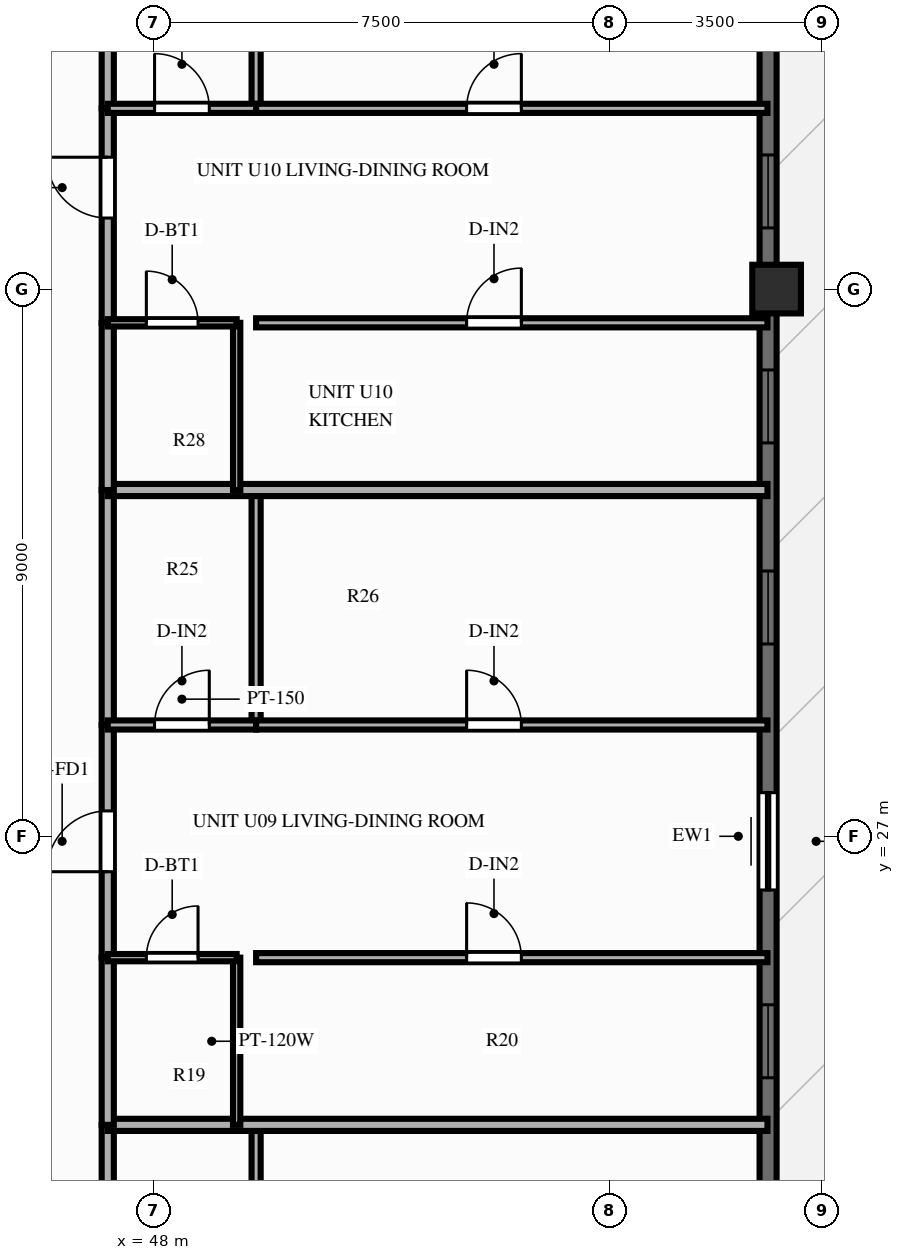
"""IFC4 building model, lengths in metres.
Left out: names, types, materials, properties, quantities, classifications, styles, units other than length and angle.
Written with IfcOpenShell. Run it as: python <this file> out.ifc"""

import sys

from ifc_helpers import new_model, si_unit, direction, frame, frame_2d, origin, origin_2d, place, context, subcontext, project, spatial, rectangle, extrude, source, transform, mapped, element, fill, save


model = new_model("IFC4")
c1 = context("Model", 3, precision=1e-05, world=origin(), true_north=direction((0.0, 1.0)))
c2 = subcontext(c1, "Body", "Model", "MODEL_VIEW")
j1 = project(units=[si_unit("LENGTHUNIT", "METRE"), si_unit("PLANEANGLEUNIT", "RADIAN")], contexts=[c1])
p1 = place(None, origin())
s1 = spatial("IfcSite", under=j1, at=p1, CompositionType="ELEMENT")
p2 = place(p1, origin())
s2 = spatial("IfcBuilding", under=s1, at=p2, CompositionType="ELEMENT")
p3 = place(p2, frame((0.0, 0.0, 179.8)))
s3 = spatial("IfcBuildingStorey", under=s2, at=p3, CompositionType="ELEMENT", Elevation=179.8)
m1 = source(origin(), c2, "Body", "SweptSolid", [
    extrude(rectangle(XDim=0.8, YDim=0.8, at=origin_2d()), origin(), (0.0, 0.0, 1.0), 3.0),
])
p4 = place(p3, frame((58.25, 36.0, 0.0), z_axis=(0.0, 0.0, 1.0), x_axis=(1.0, 0.0, 0.0)))
e1 = element("IfcColumn", 1, at=p4, inside=s3, PredefinedType="COLUMN", context=c2, shape_type="MappedRepresentation", body=[
    mapped(m1, transform((0.0, 0.0, 0.0), scale=1.0)),
])
p5 = place(p3, frame((58.11, 11.0, 0.0), z_axis=(0.0, 0.0, 1.0), x_axis=(0.0, 1.0, 0.0)))
e2 = element("IfcWall", 2, at=p5, inside=s3, PredefinedType="SOLIDWALL", context=c2, shape_type="SweptSolid", body=[
    extrude(rectangle(XDim=32.0, YDim=0.28, at=frame_2d((16.0, 0.0))), origin(), (0.0, 0.0, 1.0), 2.28),
])
p6 = place(p5, frame((1.05, 0.0, 0.25)))
e3 = element("IfcOpeningElement", 3, at=p6, cuts=e2, PredefinedType="OPENING", context=c2, shape_type="SweptSolid", body=[
    extrude(rectangle(XDim=1.2, YDim=1.5, at=frame_2d((0.6, 0.75))), frame((0.0, 0.152, 0.0), z_axis=(0.0, -1.0, 0.0), x_axis=(1.0, 0.0, 0.0)), (0.0, 0.0, 1.0), 0.304),
])
p7 = place(p5, frame((4.31, 0.0, 0.25)))
e4 = element("IfcOpeningElement", 4, at=p7, cuts=e2, PredefinedType="OPENING", context=c2, shape_type="SweptSolid", body=[
    extrude(rectangle(XDim=1.2, YDim=1.5, at=frame_2d((0.6, 0.75))), frame((0.0, 0.152, 0.0), z_axis=(0.0, -1.0, 0.0), x_axis=(1.0, 0.0, 0.0)), (0.0, 0.0, 1.0), 0.304),
])
p8 = place(p5, frame((8.882, 0.0, 0.25)))
e5 = element("IfcOpeningElement", 5, at=p8, cuts=e2, PredefinedType="OPENING", context=c2, shape_type="SweptSolid", body=[
    extrude(rectangle(XDim=1.2, YDim=1.5, at=frame_2d((0.6, 0.75))), frame((0.0, 0.152, 0.0), z_axis=(0.0, -1.0, 0.0), x_axis=(1.0, 0.0, 0.0)), (0.0, 0.0, 1.0), 0.304),
])
p9 = place(p5, frame((12.029, 0.0, 0.25)))
e6 = element("IfcOpeningElement", 6, at=p9, cuts=e2, PredefinedType="OPENING", context=c2, shape_type="SweptSolid", body=[
    extrude(rectangle(XDim=1.2, YDim=1.5, at=frame_2d((0.6, 0.75))), frame((0.0, 0.152, 0.0), z_axis=(0.0, -1.0, 0.0), x_axis=(1.0, 0.0, 0.0)), (0.0, 0.0, 1.0), 0.304),
])
p10 = place(p5, frame((16.718, 0.0, 0.0), z_axis=(0.0, 0.0, 1.0), x_axis=(-1.0, 0.0, 0.0)))
e7 = element("IfcOpeningElement", 7, at=p10, cuts=e2, PredefinedType="OPENING", context=c2, shape_type="SweptSolid", body=[
    extrude(rectangle(XDim=1.6, YDim=2.15, at=frame_2d((0.8, 1.075))), frame((0.0, 0.152, 0.0), z_axis=(0.0, -1.0, 0.0), x_axis=(1.0, 0.0, 0.0)), (0.0, 0.0, 1.0), 0.304),
])
p11 = place(p5, frame((19.163, 0.0, 0.25)))
e8 = element("IfcOpeningElement", 8, at=p11, cuts=e2, PredefinedType="OPENING", context=c2, shape_type="SweptSolid", body=[
    extrude(rectangle(XDim=1.2, YDim=1.5, at=frame_2d((0.6, 0.75))), frame((0.0, 0.152, 0.0), z_axis=(0.0, -1.0, 0.0), x_axis=(1.0, 0.0, 0.0)), (0.0, 0.0, 1.0), 0.304),
])
p12 = place(p5, frame((22.47, 0.0, 0.25)))
e9 = element("IfcOpeningElement", 9, at=p12, cuts=e2, PredefinedType="OPENING", context=c2, shape_type="SweptSolid", body=[
    extrude(rectangle(XDim=1.2, YDim=1.5, at=frame_2d((0.6, 0.75))), frame((0.0, 0.152, 0.0), z_axis=(0.0, -1.0, 0.0), x_axis=(1.0, 0.0, 0.0)), (0.0, 0.0, 1.0), 0.304),
])
p13 = place(p5, frame((26.006, 0.0, 0.25)))
e10 = element("IfcOpeningElement", 10, at=p13, cuts=e2, PredefinedType="OPENING", context=c2, shape_type="SweptSolid", body=[
    extrude(rectangle(XDim=1.2, YDim=1.5, at=frame_2d((0.6, 0.75))), frame((0.0, 0.152, 0.0), z_axis=(0.0, -1.0, 0.0), x_axis=(1.0, 0.0, 0.0)), (0.0, 0.0, 1.0), 0.304),
])
p14 = place(p5, frame((29.266, 0.0, 0.25)))
e11 = element("IfcOpeningElement", 11, at=p14, cuts=e2, PredefinedType="OPENING", context=c2, shape_type="SweptSolid", body=[
    extrude(rectangle(XDim=1.2, YDim=1.5, at=frame_2d((0.6, 0.75))), frame((0.0, 0.152, 0.0), z_axis=(0.0, -1.0, 0.0), x_axis=(1.0, 0.0, 0.0)), (0.0, 0.0, 1.0), 0.304),
])
p15 = place(p3, frame((47.25, 18.71, 0.0), z_axis=(0.0, 0.0, 1.0), x_axis=(0.0, 1.0, 0.0)))
e12 = element("IfcWall", 12, at=p15, inside=s3, PredefinedType="PARTITIONING", context=c2, shape_type="SweptSolid", body=[
    extrude(rectangle(XDim=3.544, YDim=0.2, at=frame_2d((1.772, 0.0))), origin(), (0.0, 0.0, 1.0), 2.79),
])
p16 = place(p3, frame((49.69, 18.71, 0.0), z_axis=(0.0, 0.0, 1.0), x_axis=(0.0, 1.0, 0.0)))
e13 = element("IfcWall", 13, at=p16, inside=s3, PredefinedType="PARTITIONING", context=c2, shape_type="SweptSolid", body=[
    extrude(rectangle(XDim=3.544, YDim=0.15, at=frame_2d((1.772, 0.0))), origin(), (0.0, 0.0, 1.0), 2.79),
])
p17 = place(p3, frame((47.25, 22.254, 0.0), z_axis=(0.0, 0.0, 1.0), x_axis=(1.0, 0.0, 0.0)))
e14 = element("IfcWall", 14, at=p17, inside=s3, PredefinedType="PARTITIONING", context=c2, shape_type="SweptSolid", body=[
    extrude(rectangle(XDim=10.85, YDim=0.2, at=frame_2d((5.425, 0.0))), origin(), (0.0, 0.0, 1.0), 2.39),
])
p18 = place(p3, frame((47.25, 22.254, 0.0), z_axis=(0.0, 0.0, 1.0), x_axis=(0.0, 1.0, 0.0)))
e15 = element("IfcWall", 15, at=p18, inside=s3, PredefinedType="PARTITIONING", context=c2, shape_type="SweptSolid", body=[
    extrude(rectangle(XDim=2.75, YDim=0.2, at=frame_2d((1.375, 0.0))), origin(), (0.0, 0.0, 1.0), 2.79),
])
p19 = place(p3, frame((47.25, 25.004, 0.0), z_axis=(0.0, 0.0, 1.0), x_axis=(0.0, 1.0, 0.0)))
e16 = element("IfcWall", 16, at=p19, inside=s3, PredefinedType="PARTITIONING", context=c2, shape_type="SweptSolid", body=[
    extrude(rectangle(XDim=3.827, YDim=0.2, at=frame_2d((1.914, 0.0))), origin(), (0.0, 0.0, 1.0), 2.79),
])
p20 = place(p19, frame((1.413, 0.0, 0.0)))
e17 = element("IfcOpeningElement", 17, at=p20, cuts=e16, PredefinedType="OPENING", context=c2, shape_type="SweptSolid", body=[
    extrude(rectangle(XDim=1.0, YDim=2.15, at=frame_2d((0.5, 1.075))), frame((0.0, 0.112, 0.0), z_axis=(0.0, -1.0, 0.0), x_axis=(1.0, 0.0, 0.0)), (0.0, 0.0, 1.0), 0.224),
])
p21 = place(p3, frame((47.25, 28.831, 0.0), z_axis=(0.0, 0.0, 1.0), x_axis=(0.0, 1.0, 0.0)))
e18 = element("IfcWall", 18, at=p21, inside=s3, PredefinedType="PARTITIONING", context=c2, shape_type="SweptSolid", body=[
    extrude(rectangle(XDim=3.865, YDim=0.2, at=frame_2d((1.932, 0.0))), origin(), (0.0, 0.0, 1.0), 2.79),
])
p22 = place(p3, frame((49.37, 22.254, 0.0), z_axis=(0.0, 0.0, 1.0), x_axis=(0.0, 1.0, 0.0)))
e19 = element("IfcWall", 19, at=p22, inside=s3, PredefinedType="PARTITIONING", context=c2, shape_type="SweptSolid", body=[
    extrude(rectangle(XDim=2.75, YDim=0.12, at=frame_2d((1.375, 0.0))), origin(), (0.0, 0.0, 1.0), 2.79),
])
p23 = place(p3, frame((49.69, 28.831, 0.0), z_axis=(0.0, 0.0, 1.0), x_axis=(0.0, 1.0, 0.0)))
e20 = element("IfcWall", 20, at=p23, inside=s3, PredefinedType="PARTITIONING", context=c2, shape_type="SweptSolid", body=[
    extrude(rectangle(XDim=3.865, YDim=0.15, at=frame_2d((1.932, 0.0))), origin(), (0.0, 0.0, 1.0), 2.79),
])
p24 = place(p3, frame((47.25, 25.004, 0.0), z_axis=(0.0, 0.0, 1.0), x_axis=(1.0, 0.0, 0.0)))
e21 = element("IfcWall", 21, at=p24, inside=s3, PredefinedType="PARTITIONING", context=c2, shape_type="SweptSolid", body=[
    extrude(rectangle(XDim=2.12, YDim=0.12, at=frame_2d((1.06, 0.0))), origin(), (0.0, 0.0, 1.0), 2.79),
])
p25 = place(p24, frame((0.635, 0.0, 0.0)))
e22 = element("IfcOpeningElement", 22, at=p25, cuts=e21, PredefinedType="OPENING", context=c2, shape_type="SweptSolid", body=[
    extrude(rectangle(XDim=0.85, YDim=2.05, at=frame_2d((0.425, 1.025))), frame((0.0, 0.072, 0.0), z_axis=(0.0, -1.0, 0.0), x_axis=(1.0, 0.0, 0.0)), (0.0, 0.0, 1.0), 0.144),
])
p26 = place(p3, frame((49.69, 25.004, 0.0), z_axis=(0.0, 0.0, 1.0), x_axis=(1.0, 0.0, 0.0)))
e23 = element("IfcWall", 23, at=p26, inside=s3, PredefinedType="PARTITIONING", context=c2, shape_type="SweptSolid", body=[
    extrude(rectangle(XDim=8.41, YDim=0.15, at=frame_2d((4.205, 0.0))), origin(), (0.0, 0.0, 1.0), 2.79),
])
p27 = place(p26, frame((3.462, 0.0, 0.0)))
e24 = element("IfcOpeningElement", 24, at=p27, cuts=e23, PredefinedType="OPENING", context=c2, shape_type="SweptSolid", body=[
    extrude(rectangle(XDim=0.9, YDim=2.1, at=frame_2d((0.45, 1.05))), frame((0.0, 0.087, 0.0), z_axis=(0.0, -1.0, 0.0), x_axis=(1.0, 0.0, 0.0)), (0.0, 0.0, 1.0), 0.174),
])
p28 = place(p3, frame((47.25, 28.831, 0.0), z_axis=(0.0, 0.0, 1.0), x_axis=(1.0, 0.0, 0.0)))
e25 = element("IfcWall", 25, at=p28, inside=s3, PredefinedType="PARTITIONING", context=c2, shape_type="SweptSolid", body=[
    extrude(rectangle(XDim=2.44, YDim=0.15, at=frame_2d((1.22, 0.0))), origin(), (0.0, 0.0, 1.0), 2.79),
])
p29 = place(p28, frame((0.77, 0.0, 0.0)))
e26 = element("IfcOpeningElement", 26, at=p29, cuts=e25, PredefinedType="OPENING", context=c2, shape_type="SweptSolid", body=[
    extrude(rectangle(XDim=0.9, YDim=2.1, at=frame_2d((0.45, 1.05))), frame((0.0, 0.087, 0.0), z_axis=(0.0, -1.0, 0.0), x_axis=(1.0, 0.0, 0.0)), (0.0, 0.0, 1.0), 0.174),
])
p30 = place(p3, frame((49.69, 28.831, 0.0), z_axis=(0.0, 0.0, 1.0), x_axis=(1.0, 0.0, 0.0)))
e27 = element("IfcWall", 27, at=p30, inside=s3, PredefinedType="PARTITIONING", context=c2, shape_type="SweptSolid", body=[
    extrude(rectangle(XDim=8.41, YDim=0.15, at=frame_2d((4.205, 0.0))), origin(), (0.0, 0.0, 1.0), 2.79),
])
p31 = place(p30, frame((3.462, 0.0, 0.0)))
e28 = element("IfcOpeningElement", 28, at=p31, cuts=e27, PredefinedType="OPENING", context=c2, shape_type="SweptSolid", body=[
    extrude(rectangle(XDim=0.9, YDim=2.1, at=frame_2d((0.45, 1.05))), frame((0.0, 0.087, 0.0), z_axis=(0.0, -1.0, 0.0), x_axis=(1.0, 0.0, 0.0)), (0.0, 0.0, 1.0), 0.174),
])
p32 = place(p3, frame((47.25, 32.695, 0.0), z_axis=(0.0, 0.0, 1.0), x_axis=(1.0, 0.0, 0.0)))
e29 = element("IfcWall", 29, at=p32, inside=s3, PredefinedType="PARTITIONING", context=c2, shape_type="SweptSolid", body=[
    extrude(rectangle(XDim=10.85, YDim=0.2, at=frame_2d((5.425, 0.0))), origin(), (0.0, 0.0, 1.0), 2.79),
])
p33 = place(p3, frame((47.25, 32.695, 0.0), z_axis=(0.0, 0.0, 1.0), x_axis=(0.0, 1.0, 0.0)))
e30 = element("IfcWall", 30, at=p33, inside=s3, PredefinedType="PARTITIONING", context=c2, shape_type="SweptSolid", body=[
    extrude(rectangle(XDim=2.75, YDim=0.2, at=frame_2d((1.375, 0.0))), origin(), (0.0, 0.0, 1.0), 2.79),
])
p34 = place(p3, frame((47.25, 35.445, 0.0), z_axis=(0.0, 0.0, 1.0), x_axis=(0.0, 1.0, 0.0)))
e31 = element("IfcWall", 31, at=p34, inside=s3, PredefinedType="PARTITIONING", context=c2, shape_type="SweptSolid", body=[
    extrude(rectangle(XDim=3.527, YDim=0.2, at=frame_2d((1.764, 0.0))), origin(), (0.0, 0.0, 1.0), 2.79),
])
p35 = place(p34, frame((1.724, 0.0, 0.0)))
e32 = element("IfcOpeningElement", 32, at=p35, cuts=e31, PredefinedType="OPENING", context=c2, shape_type="SweptSolid", body=[
    extrude(rectangle(XDim=1.0, YDim=2.15, at=frame_2d((0.5, 1.075))), frame((0.0, 0.112, 0.0), z_axis=(0.0, -1.0, 0.0), x_axis=(1.0, 0.0, 0.0)), (0.0, 0.0, 1.0), 0.224),
])
p36 = place(p3, frame((47.25, 38.973, 0.0), z_axis=(0.0, 0.0, 1.0), x_axis=(0.0, 1.0, 0.0)))
e33 = element("IfcWall", 33, at=p36, inside=s3, PredefinedType="PARTITIONING", context=c2, shape_type="SweptSolid", body=[
    extrude(rectangle(XDim=3.847, YDim=0.2, at=frame_2d((1.924, 0.0))), origin(), (0.0, 0.0, 1.0), 2.79),
])
p37 = place(p3, frame((49.37, 32.695, 0.0), z_axis=(0.0, 0.0, 1.0), x_axis=(0.0, 1.0, 0.0)))
e34 = element("IfcWall", 34, at=p37, inside=s3, PredefinedType="PARTITIONING", context=c2, shape_type="SweptSolid", body=[
    extrude(rectangle(XDim=2.75, YDim=0.12, at=frame_2d((1.375, 0.0))), origin(), (0.0, 0.0, 1.0), 2.79),
])
p38 = place(p3, frame((49.69, 38.973, 0.0), z_axis=(0.0, 0.0, 1.0), x_axis=(0.0, 1.0, 0.0)))
e35 = element("IfcWall", 35, at=p38, inside=s3, PredefinedType="PARTITIONING", context=c2, shape_type="SweptSolid", body=[
    extrude(rectangle(XDim=3.847, YDim=0.15, at=frame_2d((1.924, 0.0))), origin(), (0.0, 0.0, 1.0), 2.79),
])
p39 = place(p3, frame((47.25, 35.445, 0.0), z_axis=(0.0, 0.0, 1.0), x_axis=(1.0, 0.0, 0.0)))
e36 = element("IfcWall", 36, at=p39, inside=s3, PredefinedType="PARTITIONING", context=c2, shape_type="SweptSolid", body=[
    extrude(rectangle(XDim=2.12, YDim=0.12, at=frame_2d((1.06, 0.0))), origin(), (0.0, 0.0, 1.0), 2.79),
])
p40 = place(p39, frame((0.635, 0.0, 0.0)))
e37 = element("IfcOpeningElement", 37, at=p40, cuts=e36, PredefinedType="OPENING", context=c2, shape_type="SweptSolid", body=[
    extrude(rectangle(XDim=0.85, YDim=2.05, at=frame_2d((0.425, 1.025))), frame((0.0, 0.072, 0.0), z_axis=(0.0, -1.0, 0.0), x_axis=(1.0, 0.0, 0.0)), (0.0, 0.0, 1.0), 0.144),
])
p41 = place(p3, frame((49.69, 35.445, 0.0), z_axis=(0.0, 0.0, 1.0), x_axis=(1.0, 0.0, 0.0)))
e38 = element("IfcWall", 38, at=p41, inside=s3, PredefinedType="PARTITIONING", context=c2, shape_type="SweptSolid", body=[
    extrude(rectangle(XDim=8.41, YDim=0.15, at=frame_2d((4.205, 0.0))), origin(), (0.0, 0.0, 1.0), 2.79),
])
p42 = place(p41, frame((3.462, 0.0, 0.0)))
e39 = element("IfcOpeningElement", 39, at=p42, cuts=e38, PredefinedType="OPENING", context=c2, shape_type="SweptSolid", body=[
    extrude(rectangle(XDim=0.9, YDim=2.1, at=frame_2d((0.45, 1.05))), frame((0.0, 0.087, 0.0), z_axis=(0.0, -1.0, 0.0), x_axis=(1.0, 0.0, 0.0)), (0.0, 0.0, 1.0), 0.174),
])
p43 = place(p3, frame((47.25, 38.973, 0.0), z_axis=(0.0, 0.0, 1.0), x_axis=(1.0, 0.0, 0.0)))
e40 = element("IfcWall", 40, at=p43, inside=s3, PredefinedType="PARTITIONING", context=c2, shape_type="SweptSolid", body=[
    extrude(rectangle(XDim=2.44, YDim=0.15, at=frame_2d((1.22, 0.0))), origin(), (0.0, 0.0, 1.0), 2.79),
])
p44 = place(p43, frame((0.77, 0.0, 0.0)))
e41 = element("IfcOpeningElement", 41, at=p44, cuts=e40, PredefinedType="OPENING", context=c2, shape_type="SweptSolid", body=[
    extrude(rectangle(XDim=0.9, YDim=2.1, at=frame_2d((0.45, 1.05))), frame((0.0, 0.087, 0.0), z_axis=(0.0, -1.0, 0.0), x_axis=(1.0, 0.0, 0.0)), (0.0, 0.0, 1.0), 0.174),
])
p45 = place(p3, frame((49.69, 38.973, 0.0), z_axis=(0.0, 0.0, 1.0), x_axis=(1.0, 0.0, 0.0)))
e42 = element("IfcWall", 42, at=p45, inside=s3, PredefinedType="PARTITIONING", context=c2, shape_type="SweptSolid", body=[
    extrude(rectangle(XDim=8.41, YDim=0.15, at=frame_2d((4.205, 0.0))), origin(), (0.0, 0.0, 1.0), 2.79),
])
p46 = place(p45, frame((3.462, 0.0, 0.0)))
e43 = element("IfcOpeningElement", 43, at=p46, cuts=e42, PredefinedType="OPENING", context=c2, shape_type="SweptSolid", body=[
    extrude(rectangle(XDim=0.9, YDim=2.1, at=frame_2d((0.45, 1.05))), frame((0.0, 0.087, 0.0), z_axis=(0.0, -1.0, 0.0), x_axis=(1.0, 0.0, 0.0)), (0.0, 0.0, 1.0), 0.174),
])
m2 = source(origin(), c2, "Body", "SweptSolid", [
    extrude(rectangle(XDim=1.2, YDim=1.5, at=frame_2d((0.6, 0.75))), frame((0.0, 0.03, 0.0), z_axis=(0.0, -1.0, 0.0), x_axis=(1.0, 0.0, 0.0)), (0.0, 0.0, 1.0), 0.06),
])
p47 = place(p9, origin())
e44 = element("IfcWindow", 44, at=p47, inside=s3, PartitioningType="SINGLE_PANEL", PredefinedType="WINDOW", context=c2, shape_type="MappedRepresentation", body=[
    mapped(m2, transform((0.0, 0.0, 0.0), scale=1.0)),
])
fill(e6, e44)
m3 = source(origin(), c2, "Body", "SweptSolid", [
    extrude(rectangle(XDim=1.6, YDim=2.15, at=frame_2d((0.8, 1.075))), frame((0.0, 0.025, 0.0), z_axis=(0.0, -1.0, 0.0), x_axis=(1.0, 0.0, 0.0)), (0.0, 0.0, 1.0), 0.05),
])
p48 = place(p10, origin())
e45 = element("IfcDoor", 45, at=p48, inside=s3, OperationType="SLIDING_TO_LEFT", PredefinedType="DOOR", context=c2, shape_type="MappedRepresentation", body=[
    mapped(m3, transform((0.0, 0.0, 0.0), scale=1.0)),
])
fill(e7, e45)
p49 = place(p11, origin())
e46 = element("IfcWindow", 46, at=p49, inside=s3, PartitioningType="SINGLE_PANEL", PredefinedType="WINDOW", context=c2, shape_type="MappedRepresentation", body=[
    mapped(m2, transform((0.0, 0.0, 0.0), scale=1.0)),
])
fill(e8, e46)
p50 = place(p12, origin())
e47 = element("IfcWindow", 47, at=p50, inside=s3, PartitioningType="SINGLE_PANEL", PredefinedType="WINDOW", context=c2, shape_type="MappedRepresentation", body=[
    mapped(m2, transform((0.0, 0.0, 0.0), scale=1.0)),
])
fill(e9, e47)
p51 = place(p13, origin())
e48 = element("IfcWindow", 48, at=p51, inside=s3, PartitioningType="SINGLE_PANEL", PredefinedType="WINDOW", context=c2, shape_type="MappedRepresentation", body=[
    mapped(m2, transform((0.0, 0.0, 0.0), scale=1.0)),
])
fill(e10, e48)
m4 = source(origin(), c2, "Body", "SweptSolid", [
    extrude(rectangle(XDim=1.0, YDim=2.15, at=frame_2d((0.5, 1.075))), frame((0.0, 0.025, 0.0), z_axis=(0.0, -1.0, 0.0), x_axis=(1.0, 0.0, 0.0)), (0.0, 0.0, 1.0), 0.05),
])
p52 = place(p20, origin())
e49 = element("IfcDoor", 49, at=p52, inside=s3, OperationType="SINGLE_SWING_LEFT", PredefinedType="DOOR", context=c2, shape_type="MappedRepresentation", body=[
    mapped(m4, transform((0.0, 0.0, 0.0), scale=1.0)),
])
fill(e17, e49)
m5 = source(origin(), c2, "Body", "SweptSolid", [
    extrude(rectangle(XDim=0.85, YDim=2.05, at=frame_2d((0.425, 1.025))), frame((0.0, 0.025, 0.0), z_axis=(0.0, -1.0, 0.0), x_axis=(1.0, 0.0, 0.0)), (0.0, 0.0, 1.0), 0.05),
])
p53 = place(p25, origin())
e50 = element("IfcDoor", 50, at=p53, inside=s3, OperationType="SINGLE_SWING_RIGHT", PredefinedType="DOOR", context=c2, shape_type="MappedRepresentation", body=[
    mapped(m5, transform((0.0, 0.0, 0.0), scale=1.0)),
])
fill(e22, e50)
m6 = source(origin(), c2, "Body", "SweptSolid", [
    extrude(rectangle(XDim=0.9, YDim=2.1, at=frame_2d((0.45, 1.05))), frame((0.0, 0.025, 0.0), z_axis=(0.0, -1.0, 0.0), x_axis=(1.0, 0.0, 0.0)), (0.0, 0.0, 1.0), 0.05),
])
p54 = place(p27, origin())
e51 = element("IfcDoor", 51, at=p54, inside=s3, OperationType="SINGLE_SWING_LEFT", PredefinedType="DOOR", context=c2, shape_type="MappedRepresentation", body=[
    mapped(m6, transform((0.0, 0.0, 0.0), scale=1.0)),
])
fill(e24, e51)
p55 = place(p29, origin())
e52 = element("IfcDoor", 52, at=p55, inside=s3, OperationType="SINGLE_SWING_RIGHT", PredefinedType="DOOR", context=c2, shape_type="MappedRepresentation", body=[
    mapped(m6, transform((0.0, 0.0, 0.0), scale=1.0)),
])
fill(e26, e52)
p56 = place(p31, origin())
e53 = element("IfcDoor", 53, at=p56, inside=s3, OperationType="SINGLE_SWING_LEFT", PredefinedType="DOOR", context=c2, shape_type="MappedRepresentation", body=[
    mapped(m6, transform((0.0, 0.0, 0.0), scale=1.0)),
])
fill(e28, e53)
p57 = place(p35, origin())
e54 = element("IfcDoor", 54, at=p57, inside=s3, OperationType="SINGLE_SWING_RIGHT", PredefinedType="DOOR", context=c2, shape_type="MappedRepresentation", body=[
    mapped(m4, transform((0.0, 0.0, 0.0), scale=1.0)),
])
fill(e32, e54)
p58 = place(p40, origin())
e55 = element("IfcDoor", 55, at=p58, inside=s3, OperationType="SINGLE_SWING_LEFT", PredefinedType="DOOR", context=c2, shape_type="MappedRepresentation", body=[
    mapped(m5, transform((0.0, 0.0, 0.0), scale=1.0)),
])
fill(e37, e55)
p59 = place(p42, origin())
e56 = element("IfcDoor", 56, at=p59, inside=s3, OperationType="SINGLE_SWING_RIGHT", PredefinedType="DOOR", context=c2, shape_type="MappedRepresentation", body=[
    mapped(m6, transform((0.0, 0.0, 0.0), scale=1.0)),
])
fill(e39, e56)
p60 = place(p44, origin())
e57 = element("IfcDoor", 57, at=p60, inside=s3, OperationType="SINGLE_SWING_LEFT", PredefinedType="DOOR", context=c2, shape_type="MappedRepresentation", body=[
    mapped(m6, transform((0.0, 0.0, 0.0), scale=1.0)),
])
fill(e41, e57)
p61 = place(p46, origin())
e58 = element("IfcDoor", 58, at=p61, inside=s3, OperationType="SINGLE_SWING_RIGHT", PredefinedType="DOOR", context=c2, shape_type="MappedRepresentation", body=[
    mapped(m6, transform((0.0, 0.0, 0.0), scale=1.0)),
])
fill(e43, e58)
save(model, sys.argv[1])
